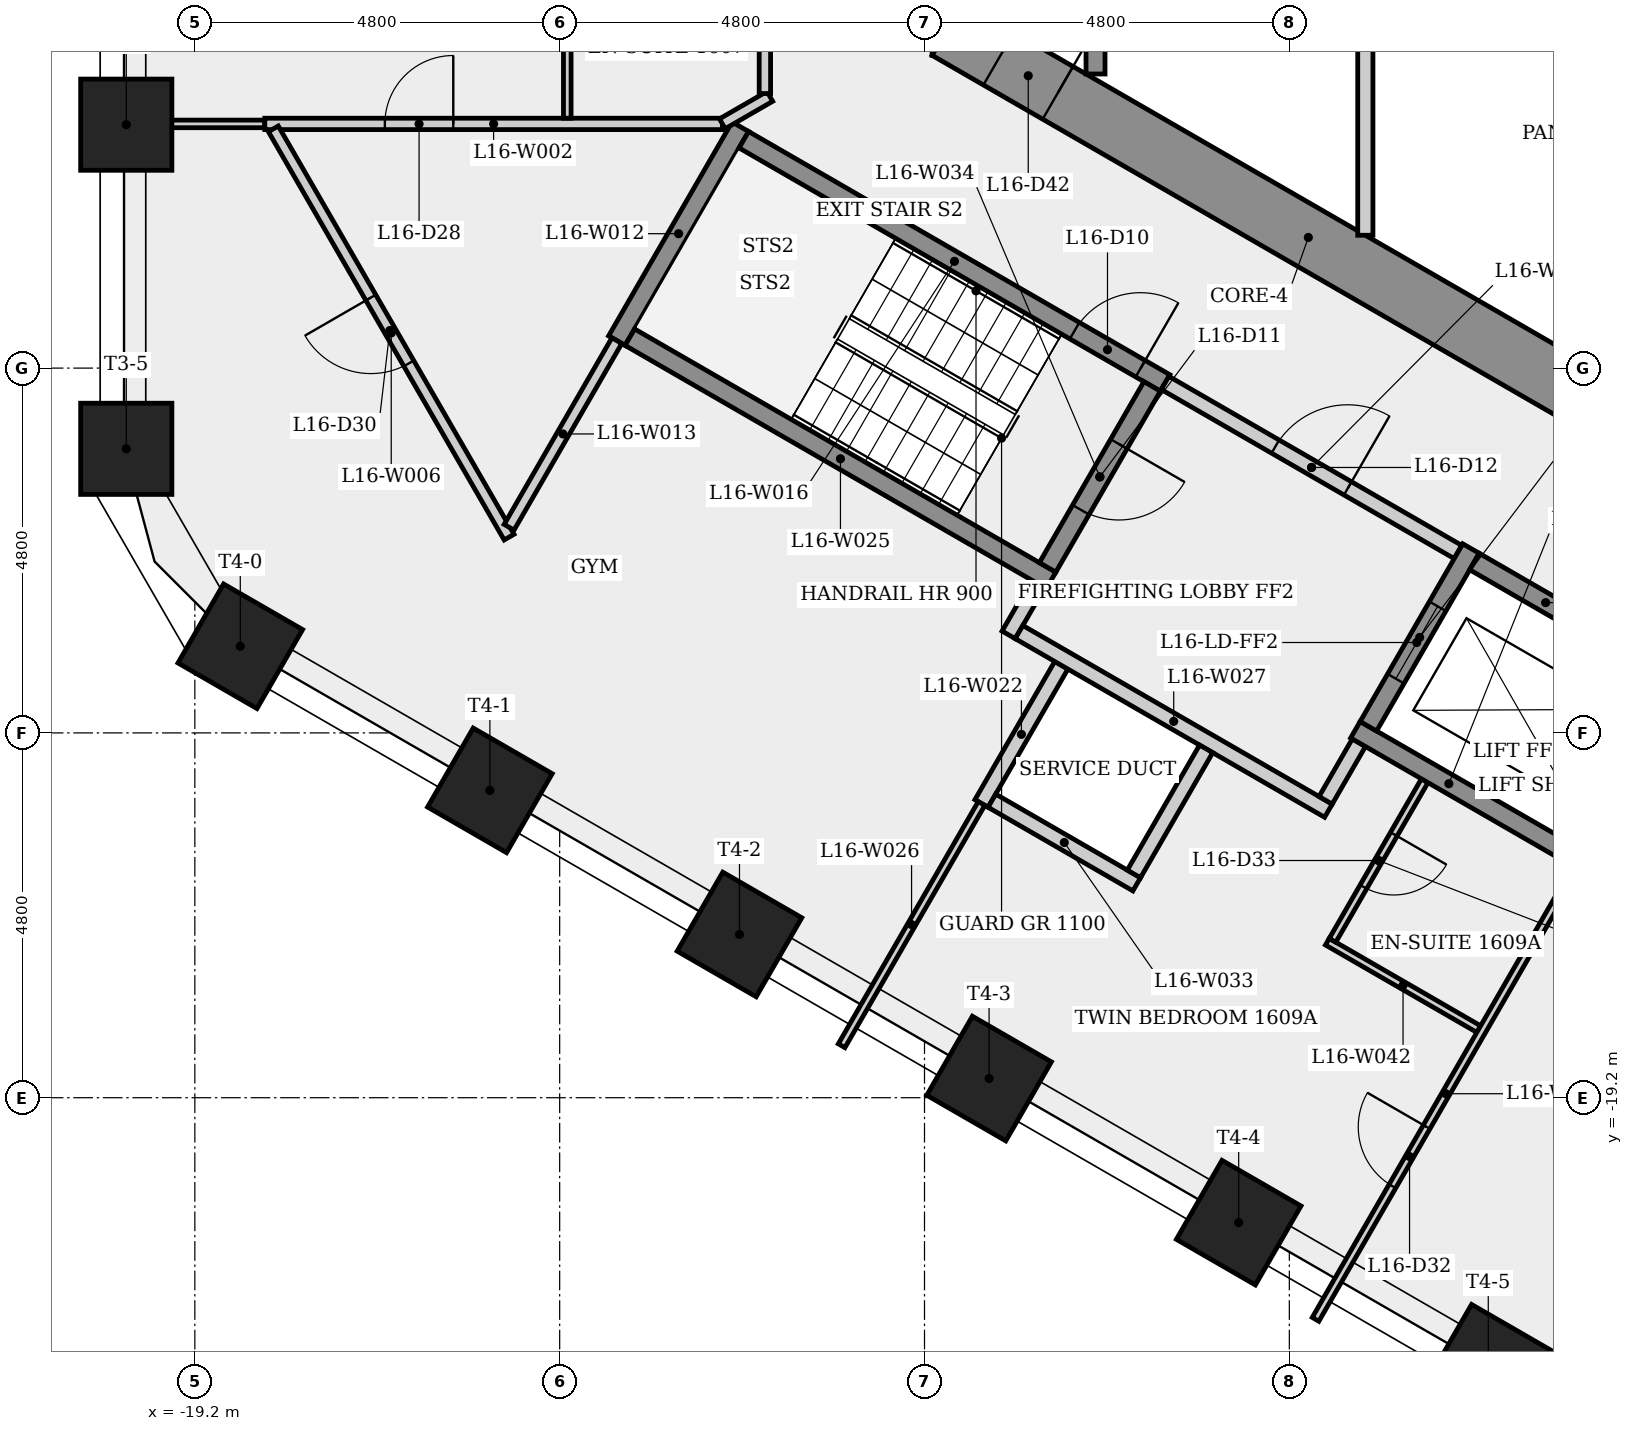
"""IFC4 building model, lengths in metres.
Left out: names, types, materials, properties, quantities, classifications, styles, units other than length and angle.
Written with IfcOpenShell. Run it as: python <this file> out.ifc"""

import sys

from ifc_helpers import new_model, si_unit, direction, frame, frame_2d, origin, origin_2d, place, context, subcontext, project, spatial, rectangle, extrude, element, fill, save


model = new_model("IFC4")
c1 = context("Model", 3, precision=1e-05, world=origin(), true_north=direction((0.0, 1.0)))
c2 = subcontext(c1, "Body", "Model", "MODEL_VIEW")
j1 = project(units=[si_unit("LENGTHUNIT", "METRE"), si_unit("PLANEANGLEUNIT", "RADIAN")], contexts=[c1])
p1 = place(None, origin())
s1 = spatial("IfcSite", under=j1, at=p1, CompositionType="ELEMENT")
p2 = place(p1, origin())
s2 = spatial("IfcBuilding", under=s1, at=p2, CompositionType="ELEMENT")
p3 = place(p2, frame((0.0, 0.0, 62.9)))
s3 = spatial("IfcBuildingStorey", under=s2, at=p3, CompositionType="ELEMENT", Elevation=62.9)
p4 = place(p3, frame((-9.1, 5.485, 0.0), z_axis=(0.0, 0.0, 1.0), x_axis=(0.0, -1.0, 0.0)))
e1 = element("IfcWall", 1, at=p4, inside=s3, PredefinedType="SHEAR", context=c2, shape_type="SweptSolid", body=[
    extrude(rectangle(XDim=10.97, YDim=0.8, at=frame_2d((5.485, 0.0))), origin(), (0.0, 0.0, 1.0), 3.4),
])
p5 = place(p4, frame((4.685, 0.0, 0.0)))
e2 = element("IfcOpeningElement", 2, at=p5, cuts=e1, PredefinedType="OPENING", context=c2, shape_type="SweptSolid", body=[
    extrude(rectangle(XDim=1.6, YDim=2.1, at=frame_2d((0.8, 1.05))), frame((0.0, 0.41, 0.0), z_axis=(0.0, -1.0, 0.0), x_axis=(1.0, 0.0, 0.0)), (0.0, 0.0, 1.0), 0.82),
])
p6 = place(p3, frame((-9.3, -5.138, 0.0), z_axis=(0.0, 0.0, 1.0), x_axis=(0.866023993627, -0.500002442456, 0.0)))
e3 = element("IfcWall", 3, at=p6, inside=s3, PredefinedType="SHEAR", context=c2, shape_type="SweptSolid", body=[
    extrude(rectangle(XDim=10.97, YDim=0.8, at=frame_2d((5.485, 0.0))), origin(), (0.0, 0.0, 1.0), 3.4),
])
p7 = place(p6, frame((0.78, 0.0, 0.0)))
e4 = element("IfcOpeningElement", 4, at=p7, cuts=e3, PredefinedType="OPENING", context=c2, shape_type="SweptSolid", body=[
    extrude(rectangle(XDim=0.9, YDim=2.1, at=frame_2d((0.45, 1.05))), frame((0.0, 0.41, 0.0), z_axis=(0.0, -1.0, 0.0), x_axis=(1.0, 0.0, 0.0)), (0.0, 0.0, 1.0), 0.82),
])
for number, where, z_axis, x_axis in (
    (5, (-20.102, -6.397, 0.0), (0.0, 0.0, 1.0), (-1.0, 0.0, 0.0)),
    (6, (-20.102, -10.662, 0.0), (0.0, 0.0, 1.0), (-1.0, 0.0, 0.0)),
    (7, (-18.602, -13.26, 0.0), (0.0, 0.0, 1.0), (-0.5, -0.866, 0.0)),
    (8, (-15.318, -15.156, 0.0), (0.0, 0.0, 1.0), (-0.5, -0.866, 0.0)),
    (9, (-12.034, -17.052, 0.0), (0.0, 0.0, 1.0), (-0.5, -0.866, 0.0)),
    (10, (-8.75, -18.948, 0.0), (0.0, 0.0, 1.0), (-0.5, -0.866, 0.0)),
    (11, (-5.466, -20.844, 0.0), (0.0, 0.0, 1.0), (-0.5, -0.866, 0.0)),
    (12, (-2.182, -22.74, 0.0), (0.0, 0.0, 1.0), (-0.5, -0.866, 0.0)),
):
    element("IfcColumn", number, at=place(p3, frame(where, z_axis=z_axis, x_axis=x_axis)), inside=s3, PredefinedType="COLUMN", context=c2, shape_type="SweptSolid", body=[
        extrude(rectangle(XDim=1.2, YDim=1.2, at=origin_2d()), origin(), (0.0, 0.0, 1.0), 3.4),
    ])
p8 = place(p3, frame((-18.28, -6.387, 0.0), z_axis=(0.0, 0.0, 1.0), x_axis=(-1.0, 0.0, 0.0)))
e13 = element("IfcWall", 13, at=p8, inside=s3, PredefinedType="PARTITIONING", context=c2, shape_type="SweptSolid", body=[
    extrude(rectangle(XDim=1.852, YDim=0.1, at=frame_2d((0.926, 0.0))), origin(), (0.0, 0.0, 1.0), 3.0),
])
p9 = place(p3, frame((-18.28, -6.387, 0.0), z_axis=(0.0, 0.0, 1.0), x_axis=(1.0, 0.0, 0.0)))
e14 = element("IfcWall", 14, at=p9, inside=s3, PredefinedType="PARTITIONING", context=c2, shape_type="SweptSolid", body=[
    extrude(rectangle(XDim=6.021, YDim=0.15, at=frame_2d((3.01, 0.0))), origin(), (0.0, 0.0, 1.0), 3.0),
])
p10 = place(p9, frame((1.58, 0.0, 0.0)))
e15 = element("IfcOpeningElement", 15, at=p10, cuts=e14, PredefinedType="OPENING", context=c2, shape_type="SweptSolid", body=[
    extrude(rectangle(XDim=0.9, YDim=2.1, at=frame_2d((0.45, 1.05))), frame((0.0, 0.085, 0.0), z_axis=(0.0, -1.0, 0.0), x_axis=(1.0, 0.0, 0.0)), (0.0, 0.0, 1.0), 0.17),
])
p11 = place(p3, frame((-15.065, -11.824, 0.0), z_axis=(0.0, 0.0, 1.0), x_axis=(-0.499999547685, 0.866025664929, 0.0)))
e16 = element("IfcWall", 16, at=p11, inside=s3, PredefinedType="PARTITIONING", context=c2, shape_type="SweptSolid", body=[
    extrude(rectangle(XDim=6.203, YDim=0.15, at=frame_2d((3.102, 0.0))), origin(), (0.0, 0.0, 1.0), 3.0),
])
p12 = place(p11, frame((2.639, 0.0, 0.0)))
e17 = element("IfcOpeningElement", 17, at=p12, cuts=e16, PredefinedType="OPENING", context=c2, shape_type="SweptSolid", body=[
    extrude(rectangle(XDim=1.0, YDim=2.1, at=frame_2d((0.5, 1.05))), frame((0.0, 0.085, 0.0), z_axis=(0.0, -1.0, 0.0), x_axis=(1.0, 0.0, 0.0)), (0.0, 0.0, 1.0), 0.17),
])
p13 = place(p3, frame((-14.3, -4.037, 0.0), z_axis=(0.0, 0.0, 1.0), x_axis=(0.0, -1.0, 0.0)))
e18 = element("IfcWall", 18, at=p13, inside=s3, PredefinedType="PARTITIONING", context=c2, shape_type="SweptSolid", body=[
    extrude(rectangle(XDim=2.275, YDim=0.1, at=frame_2d((1.138, 0.0))), origin(), (0.0, 0.0, 1.0), 3.0),
])
p14 = place(p3, frame((-13.648, -9.239, 0.0), z_axis=(0.0, 0.0, 1.0), x_axis=(0.500017246033, 0.866015446554, 0.0)))
e19 = element("IfcWall", 19, at=p14, inside=s3, PredefinedType="SHEAR", context=c2, shape_type="SweptSolid", body=[
    extrude(rectangle(XDim=3.25, YDim=0.25, at=frame_2d((1.625, 0.0))), origin(), (0.0, 0.0, 1.0), 3.0),
])
p15 = place(p3, frame((-13.648, -9.239, 0.0), z_axis=(0.0, 0.0, 1.0), x_axis=(-0.500037995954, -0.866003465699, 0.0)))
e20 = element("IfcWall", 20, at=p15, inside=s3, PredefinedType="PARTITIONING", context=c2, shape_type="SweptSolid", body=[
    extrude(rectangle(XDim=2.835, YDim=0.15, at=frame_2d((1.417, 0.0))), origin(), (0.0, 0.0, 1.0), 3.0),
])
p16 = place(p3, frame((-12.26, -6.385, 0.0), z_axis=(0.0, 0.0, 1.0), x_axis=(0.865943239699, 0.500142285375, 0.0)))
e21 = element("IfcWall", 21, at=p16, inside=s3, PredefinedType="PARTITIONING", context=c2, shape_type="SweptSolid", body=[
    extrude(rectangle(XDim=0.721, YDim=0.15, at=frame_2d((0.361, 0.0))), origin(), (0.0, 0.0, 1.0), 3.0),
])
p17 = place(p3, frame((-11.977, -6.595, 0.0), z_axis=(0.0, 0.0, 1.0), x_axis=(0.866025499775, -0.499999833739, 0.0)))
e22 = element("IfcWall", 22, at=p17, inside=s3, PredefinedType="SHEAR", context=c2, shape_type="SweptSolid", body=[
    extrude(rectangle(XDim=6.4, YDim=0.25, at=frame_2d((3.2, 0.0))), origin(), (0.0, 0.0, 1.0), 3.0),
])
p18 = place(p17, frame((5.025, 0.0, 0.0)))
e23 = element("IfcOpeningElement", 23, at=p18, cuts=e22, PredefinedType="OPENING", context=c2, shape_type="SweptSolid", body=[
    extrude(rectangle(XDim=1.0, YDim=2.1, at=frame_2d((0.5, 1.05))), frame((0.0, 0.135, 0.0), z_axis=(0.0, -1.0, 0.0), x_axis=(1.0, 0.0, 0.0)), (0.0, 0.0, 1.0), 0.27),
])
p19 = place(p3, frame((-11.7, 6.137, 0.0), z_axis=(0.0, 0.0, 1.0), x_axis=(0.0, -1.0, 0.0)))
e24 = element("IfcWall", 24, at=p19, inside=s3, PredefinedType="PARTITIONING", context=c2, shape_type="SweptSolid", body=[
    extrude(rectangle(XDim=12.125, YDim=0.15, at=frame_2d((6.062, 0.0))), origin(), (0.0, 0.0, 1.0), 3.0),
])
p20 = place(p19, frame((6.837, 0.0, 0.0)))
e25 = element("IfcOpeningElement", 25, at=p20, cuts=e24, PredefinedType="OPENING", context=c2, shape_type="SweptSolid", body=[
    extrude(rectangle(XDim=0.9, YDim=2.1, at=frame_2d((0.45, 1.05))), frame((0.0, 0.085, 0.0), z_axis=(0.0, -1.0, 0.0), x_axis=(1.0, 0.0, 0.0)), (0.0, 0.0, 1.0), 0.17),
])
p21 = place(p3, frame((-8.85, -15.329, 0.0), z_axis=(0.0, 0.0, 1.0), x_axis=(0.500027713859, 0.866009402589, 0.0)))
e26 = element("IfcWall", 26, at=p21, inside=s3, PredefinedType="PLUMBINGWALL", context=c2, shape_type="SweptSolid", body=[
    extrude(rectangle(XDim=2.1, YDim=0.2, at=frame_2d((1.05, 0.0))), origin(), (0.0, 0.0, 1.0), 3.0),
])
p22 = place(p3, frame((-8.493, -13.11, 0.0), z_axis=(0.0, 0.0, 1.0), x_axis=(0.500067724834, 0.865986299303, 0.0)))
e27 = element("IfcWall", 27, at=p22, inside=s3, PredefinedType="PARTITIONING", context=c2, shape_type="SweptSolid", body=[
    extrude(rectangle(XDim=0.775, YDim=0.2, at=frame_2d((0.388, 0.0))), origin(), (0.0, 0.0, 1.0), 3.0),
])
p23 = place(p3, frame((-7.935, -12.393, 0.0), z_axis=(0.0, 0.0, 1.0), x_axis=(-0.866025499775, 0.499999833739, 0.0)))
e28 = element("IfcWall", 28, at=p23, inside=s3, PredefinedType="SHEAR", context=c2, shape_type="SweptSolid", body=[
    extrude(rectangle(XDim=6.4, YDim=0.25, at=frame_2d((3.2, 0.0))), origin(), (0.0, 0.0, 1.0), 3.0),
])
p24 = place(p3, frame((-10.69, -18.516, 0.0), z_axis=(0.0, 0.0, 1.0), x_axis=(0.499955964762, 0.866050826049, 0.0)))
e29 = element("IfcWall", 29, at=p24, inside=s3, PredefinedType="PARTITIONING", context=c2, shape_type="SweptSolid", body=[
    extrude(rectangle(XDim=3.68, YDim=0.1, at=frame_2d((1.84, 0.0))), origin(), (0.0, 0.0, 1.0), 3.0),
])
p25 = place(p3, frame((-8.356, -13.073, 0.0), z_axis=(0.0, 0.0, 1.0), x_axis=(0.866038532462, -0.499977259774, 0.0)))
e30 = element("IfcWall", 30, at=p25, inside=s3, PredefinedType="PARTITIONING", context=c2, shape_type="SweptSolid", body=[
    extrude(rectangle(XDim=4.7, YDim=0.2, at=frame_2d((2.35, 0.0))), origin(), (0.0, 0.0, 1.0), 3.0),
])
p26 = place(p3, frame((-7.35, -5.73, 0.0), z_axis=(0.0, 0.0, 1.0), x_axis=(0.0, 1.0, 0.0)))
e31 = element("IfcWall", 31, at=p26, inside=s3, PredefinedType="SHEAR", context=c2, shape_type="SweptSolid", body=[
    extrude(rectangle(XDim=4.055, YDim=0.25, at=frame_2d((2.028, 0.0))), origin(), (0.0, 0.0, 1.0), 3.0),
])
p27 = place(p3, frame((-6.808, -16.392, 0.0), z_axis=(0.0, 0.0, 1.0), x_axis=(-0.866008176907, 0.50002983664, 0.0)))
e32 = element("IfcWall", 32, at=p27, inside=s3, PredefinedType="PLUMBINGWALL", context=c2, shape_type="SweptSolid", body=[
    extrude(rectangle(XDim=2.2, YDim=0.2, at=frame_2d((1.1, 0.0))), origin(), (0.0, 0.0, 1.0), 3.0),
])
p28 = place(p3, frame((-6.605, -9.841, 0.0), z_axis=(0.0, 0.0, 1.0), x_axis=(-0.499996545922, -0.866027397988, 0.0)))
e33 = element("IfcWall", 33, at=p28, inside=s3, PredefinedType="SHEAR", context=c2, shape_type="SweptSolid", body=[
    extrude(rectangle(XDim=2.75, YDim=0.25, at=frame_2d((1.375, 0.0))), origin(), (0.0, 0.0, 1.0), 3.0),
])
p29 = place(p28, frame((0.875, 0.0, 0.0)))
e34 = element("IfcOpeningElement", 34, at=p29, cuts=e33, PredefinedType="OPENING", context=c2, shape_type="SweptSolid", body=[
    extrude(rectangle(XDim=1.0, YDim=2.1, at=frame_2d((0.5, 1.05))), frame((0.0, 0.135, 0.0), z_axis=(0.0, -1.0, 0.0), x_axis=(1.0, 0.0, 0.0)), (0.0, 0.0, 1.0), 0.27),
])
p30 = place(p3, frame((-6.435, -9.795, 0.0), z_axis=(0.0, 0.0, 1.0), x_axis=(0.866012907634, -0.500021643343, 0.0)))
e35 = element("IfcWall", 35, at=p30, inside=s3, PredefinedType="PARTITIONING", context=c2, shape_type="SweptSolid", body=[
    extrude(rectangle(XDim=4.45, YDim=0.2, at=frame_2d((2.225, 0.0))), origin(), (0.0, 0.0, 1.0), 3.0),
])
p31 = place(p30, frame((1.675, 0.0, 0.0)))
e36 = element("IfcOpeningElement", 36, at=p31, cuts=e35, PredefinedType="OPENING", context=c2, shape_type="SweptSolid", body=[
    extrude(rectangle(XDim=1.1, YDim=2.1, at=frame_2d((0.55, 1.05))), frame((0.0, 0.11, 0.0), z_axis=(0.0, -1.0, 0.0), x_axis=(1.0, 0.0, 0.0)), (0.0, 0.0, 1.0), 0.22),
])
p32 = place(p3, frame((-5.895, -14.61, 0.0), z_axis=(0.0, 0.0, 1.0), x_axis=(-0.500022797313, -0.86601224135, 0.0)))
e37 = element("IfcWall", 37, at=p32, inside=s3, PredefinedType="PLUMBINGWALL", context=c2, shape_type="SweptSolid", body=[
    extrude(rectangle(XDim=1.9, YDim=0.2, at=frame_2d((0.95, 0.0))), origin(), (0.0, 0.0, 1.0), 3.0),
])
p33 = place(p3, frame((-4.3, -17.147, 0.0), z_axis=(0.0, 0.0, 1.0), x_axis=(0.866053019151, -0.499952165731, 0.0)))
e38 = element("IfcWall", 38, at=p33, inside=s3, PredefinedType="PARTITIONING", context=c2, shape_type="SweptSolid", body=[
    extrude(rectangle(XDim=2.3, YDim=0.1, at=frame_2d((1.15, 0.0))), origin(), (0.0, 0.0, 1.0), 3.0),
])
p34 = place(p3, frame((-4.455, -22.116, 0.0), z_axis=(0.0, 0.0, 1.0), x_axis=(0.499984476993, 0.866034365811, 0.0)))
e39 = element("IfcWall", 39, at=p34, inside=s3, PredefinedType="PARTITIONING", context=c2, shape_type="SweptSolid", body=[
    extrude(rectangle(XDim=6.856, YDim=0.1, at=frame_2d((3.428, 0.0))), origin(), (0.0, 0.0, 1.0), 3.0),
])
p35 = place(p34, frame((2.023, 0.0, 0.0)))
e40 = element("IfcOpeningElement", 40, at=p35, cuts=e39, PredefinedType="OPENING", context=c2, shape_type="SweptSolid", body=[
    extrude(rectangle(XDim=0.9, YDim=2.1, at=frame_2d((0.45, 1.05))), frame((0.0, 0.06, 0.0), z_axis=(0.0, -1.0, 0.0), x_axis=(1.0, 0.0, 0.0)), (0.0, 0.0, 1.0), 0.12),
])
p36 = place(p3, frame((-3.885, -14.529, 0.0), z_axis=(0.0, 0.0, 1.0), x_axis=(-0.499859285417, -0.866106630146, 0.0)))
e41 = element("IfcWall", 41, at=p36, inside=s3, PredefinedType="PARTITIONING", context=c2, shape_type="SweptSolid", body=[
    extrude(rectangle(XDim=0.875, YDim=0.2, at=frame_2d((0.438, 0.0))), origin(), (0.0, 0.0, 1.0), 3.0),
])
p37 = place(p3, frame((-3.8, -5.275, 0.0), z_axis=(0.0, 0.0, 1.0), x_axis=(0.0, -1.0, 0.0)))
e42 = element("IfcWall", 42, at=p37, inside=s3, PredefinedType="PARTITIONING", context=c2, shape_type="SweptSolid", body=[
    extrude(rectangle(XDim=2.577, YDim=0.2, at=frame_2d((1.289, 0.0))), origin(), (0.0, 0.0, 1.0), 3.0),
])
p38 = place(p3, frame((-3.019, -15.029, 0.0), z_axis=(0.0, 0.0, 1.0), x_axis=(-0.499972286653, -0.866041403502, 0.0)))
e43 = element("IfcWall", 43, at=p38, inside=s3, PredefinedType="PARTITIONING", context=c2, shape_type="SweptSolid", body=[
    extrude(rectangle(XDim=2.425, YDim=0.1, at=frame_2d((1.212, 0.0))), origin(), (0.0, 0.0, 1.0), 3.0),
])
p39 = place(p38, frame((0.812, 0.0, 0.0)))
e44 = element("IfcOpeningElement", 44, at=p39, cuts=e43, PredefinedType="OPENING", context=c2, shape_type="SweptSolid", body=[
    extrude(rectangle(XDim=0.8, YDim=2.1, at=frame_2d((0.4, 1.05))), frame((0.0, 0.06, 0.0), z_axis=(0.0, -1.0, 0.0), x_axis=(1.0, 0.0, 0.0)), (0.0, 0.0, 1.0), 0.12),
])
p40 = place(p3, frame((-3.931, -14.358, 0.0), z_axis=(0.0, 0.0, 1.0), x_axis=(0.8660424351, -0.499970499736, 0.0)))
e45 = element("IfcWall", 45, at=p40, inside=s3, PredefinedType="SHEAR", context=c2, shape_type="SweptSolid", body=[
    extrude(rectangle(XDim=3.55, YDim=0.25, at=frame_2d((1.775, 0.0))), origin(), (0.0, 0.0, 1.0), 3.0),
])
p41 = place(p3, frame((-2.41, -11.974, 0.0), z_axis=(0.0, 0.0, 1.0), x_axis=(-0.50000943426, -0.866019956843, 0.0)))
e46 = element("IfcWall", 46, at=p41, inside=s3, PredefinedType="SHEAR", context=c2, shape_type="SweptSolid", body=[
    extrude(rectangle(XDim=2.7, YDim=0.25, at=frame_2d((1.35, 0.0))), origin(), (0.0, 0.0, 1.0), 3.0),
])
p42 = place(p41, frame((0.877, 0.0, 0.0)))
e47 = element("IfcOpeningElement", 47, at=p42, cuts=e46, PredefinedType="OPENING", context=c2, shape_type="SweptSolid", body=[
    extrude(rectangle(XDim=1.1, YDim=2.1, at=frame_2d((0.55, 1.05))), frame((0.0, 0.135, 0.0), z_axis=(0.0, -1.0, 0.0), x_axis=(1.0, 0.0, 0.0)), (0.0, 0.0, 1.0), 0.27),
])
p43 = place(p3, frame((-2.364, -12.145, 0.0), z_axis=(0.0, 0.0, 1.0), x_axis=(0.86603892542, -0.499976579108, 0.0)))
e48 = element("IfcWall", 48, at=p43, inside=s3, PredefinedType="SHEAR", context=c2, shape_type="SweptSolid", body=[
    extrude(rectangle(XDim=2.162, YDim=0.25, at=frame_2d((1.081, 0.0))), origin(), (0.0, 0.0, 1.0), 3.0),
])
p44 = place(p18, origin())
e49 = element("IfcDoor", 49, at=p44, inside=s3, OperationType="SINGLE_SWING_RIGHT", PredefinedType="DOOR", context=c2, shape_type="SweptSolid", body=[
    extrude(rectangle(XDim=1.0, YDim=2.1, at=frame_2d((0.5, 1.05))), frame((0.0, 0.025, 0.0), z_axis=(0.0, -1.0, 0.0), x_axis=(1.0, 0.0, 0.0)), (0.0, 0.0, 1.0), 0.05),
])
fill(e23, e49)
p45 = place(p29, origin())
e50 = element("IfcDoor", 50, at=p45, inside=s3, OperationType="SINGLE_SWING_LEFT", PredefinedType="DOOR", context=c2, shape_type="SweptSolid", body=[
    extrude(rectangle(XDim=1.0, YDim=2.1, at=frame_2d((0.5, 1.05))), frame((0.0, 0.025, 0.0), z_axis=(0.0, -1.0, 0.0), x_axis=(1.0, 0.0, 0.0)), (0.0, 0.0, 1.0), 0.05),
])
fill(e34, e50)
p46 = place(p31, origin())
e51 = element("IfcDoor", 51, at=p46, inside=s3, OperationType="SINGLE_SWING_RIGHT", PredefinedType="DOOR", context=c2, shape_type="SweptSolid", body=[
    extrude(rectangle(XDim=1.1, YDim=2.1, at=frame_2d((0.55, 1.05))), frame((0.0, 0.025, 0.0), z_axis=(0.0, -1.0, 0.0), x_axis=(1.0, 0.0, 0.0)), (0.0, 0.0, 1.0), 0.05),
])
fill(e36, e51)
p47 = place(p42, origin())
e52 = element("IfcDoor", 52, at=p47, inside=s3, OperationType="SLIDING_TO_LEFT", PredefinedType="DOOR", context=c2, shape_type="SweptSolid", body=[
    extrude(rectangle(XDim=1.1, YDim=2.1, at=frame_2d((0.55, 1.05))), frame((0.0, 0.025, 0.0), z_axis=(0.0, -1.0, 0.0), x_axis=(1.0, 0.0, 0.0)), (0.0, 0.0, 1.0), 0.05),
])
fill(e47, e52)
p48 = place(p10, origin())
e53 = element("IfcDoor", 53, at=p48, inside=s3, OperationType="SINGLE_SWING_RIGHT", PredefinedType="DOOR", context=c2, shape_type="SweptSolid", body=[
    extrude(rectangle(XDim=0.9, YDim=2.1, at=frame_2d((0.45, 1.05))), frame((0.0, 0.025, 0.0), z_axis=(0.0, -1.0, 0.0), x_axis=(1.0, 0.0, 0.0)), (0.0, 0.0, 1.0), 0.05),
])
fill(e15, e53)
p49 = place(p12, origin())
e54 = element("IfcDoor", 54, at=p49, inside=s3, OperationType="SINGLE_SWING_RIGHT", PredefinedType="DOOR", context=c2, shape_type="SweptSolid", body=[
    extrude(rectangle(XDim=1.0, YDim=2.1, at=frame_2d((0.5, 1.05))), frame((0.0, 0.025, 0.0), z_axis=(0.0, -1.0, 0.0), x_axis=(1.0, 0.0, 0.0)), (0.0, 0.0, 1.0), 0.05),
])
fill(e17, e54)
p50 = place(p35, origin())
e55 = element("IfcDoor", 55, at=p50, inside=s3, OperationType="SINGLE_SWING_RIGHT", PredefinedType="DOOR", context=c2, shape_type="SweptSolid", body=[
    extrude(rectangle(XDim=0.9, YDim=2.1, at=frame_2d((0.45, 1.05))), frame((0.0, 0.025, 0.0), z_axis=(0.0, -1.0, 0.0), x_axis=(1.0, 0.0, 0.0)), (0.0, 0.0, 1.0), 0.05),
])
fill(e40, e55)
p51 = place(p39, origin())
e56 = element("IfcDoor", 56, at=p51, inside=s3, OperationType="SINGLE_SWING_LEFT", PredefinedType="DOOR", context=c2, shape_type="SweptSolid", body=[
    extrude(rectangle(XDim=0.8, YDim=2.1, at=frame_2d((0.4, 1.05))), frame((0.0, 0.025, 0.0), z_axis=(0.0, -1.0, 0.0), x_axis=(1.0, 0.0, 0.0)), (0.0, 0.0, 1.0), 0.05),
])
fill(e44, e56)
p52 = place(p7, origin())
e57 = element("IfcDoor", 57, at=p52, inside=s3, OperationType="SINGLE_SWING_RIGHT", PredefinedType="DOOR", context=c2, shape_type="SweptSolid", body=[
    extrude(rectangle(XDim=0.9, YDim=2.1, at=frame_2d((0.45, 1.05))), frame((0.0, 0.025, 0.0), z_axis=(0.0, -1.0, 0.0), x_axis=(1.0, 0.0, 0.0)), (0.0, 0.0, 1.0), 0.05),
])
fill(e4, e57)
save(model, sys.argv[1])
